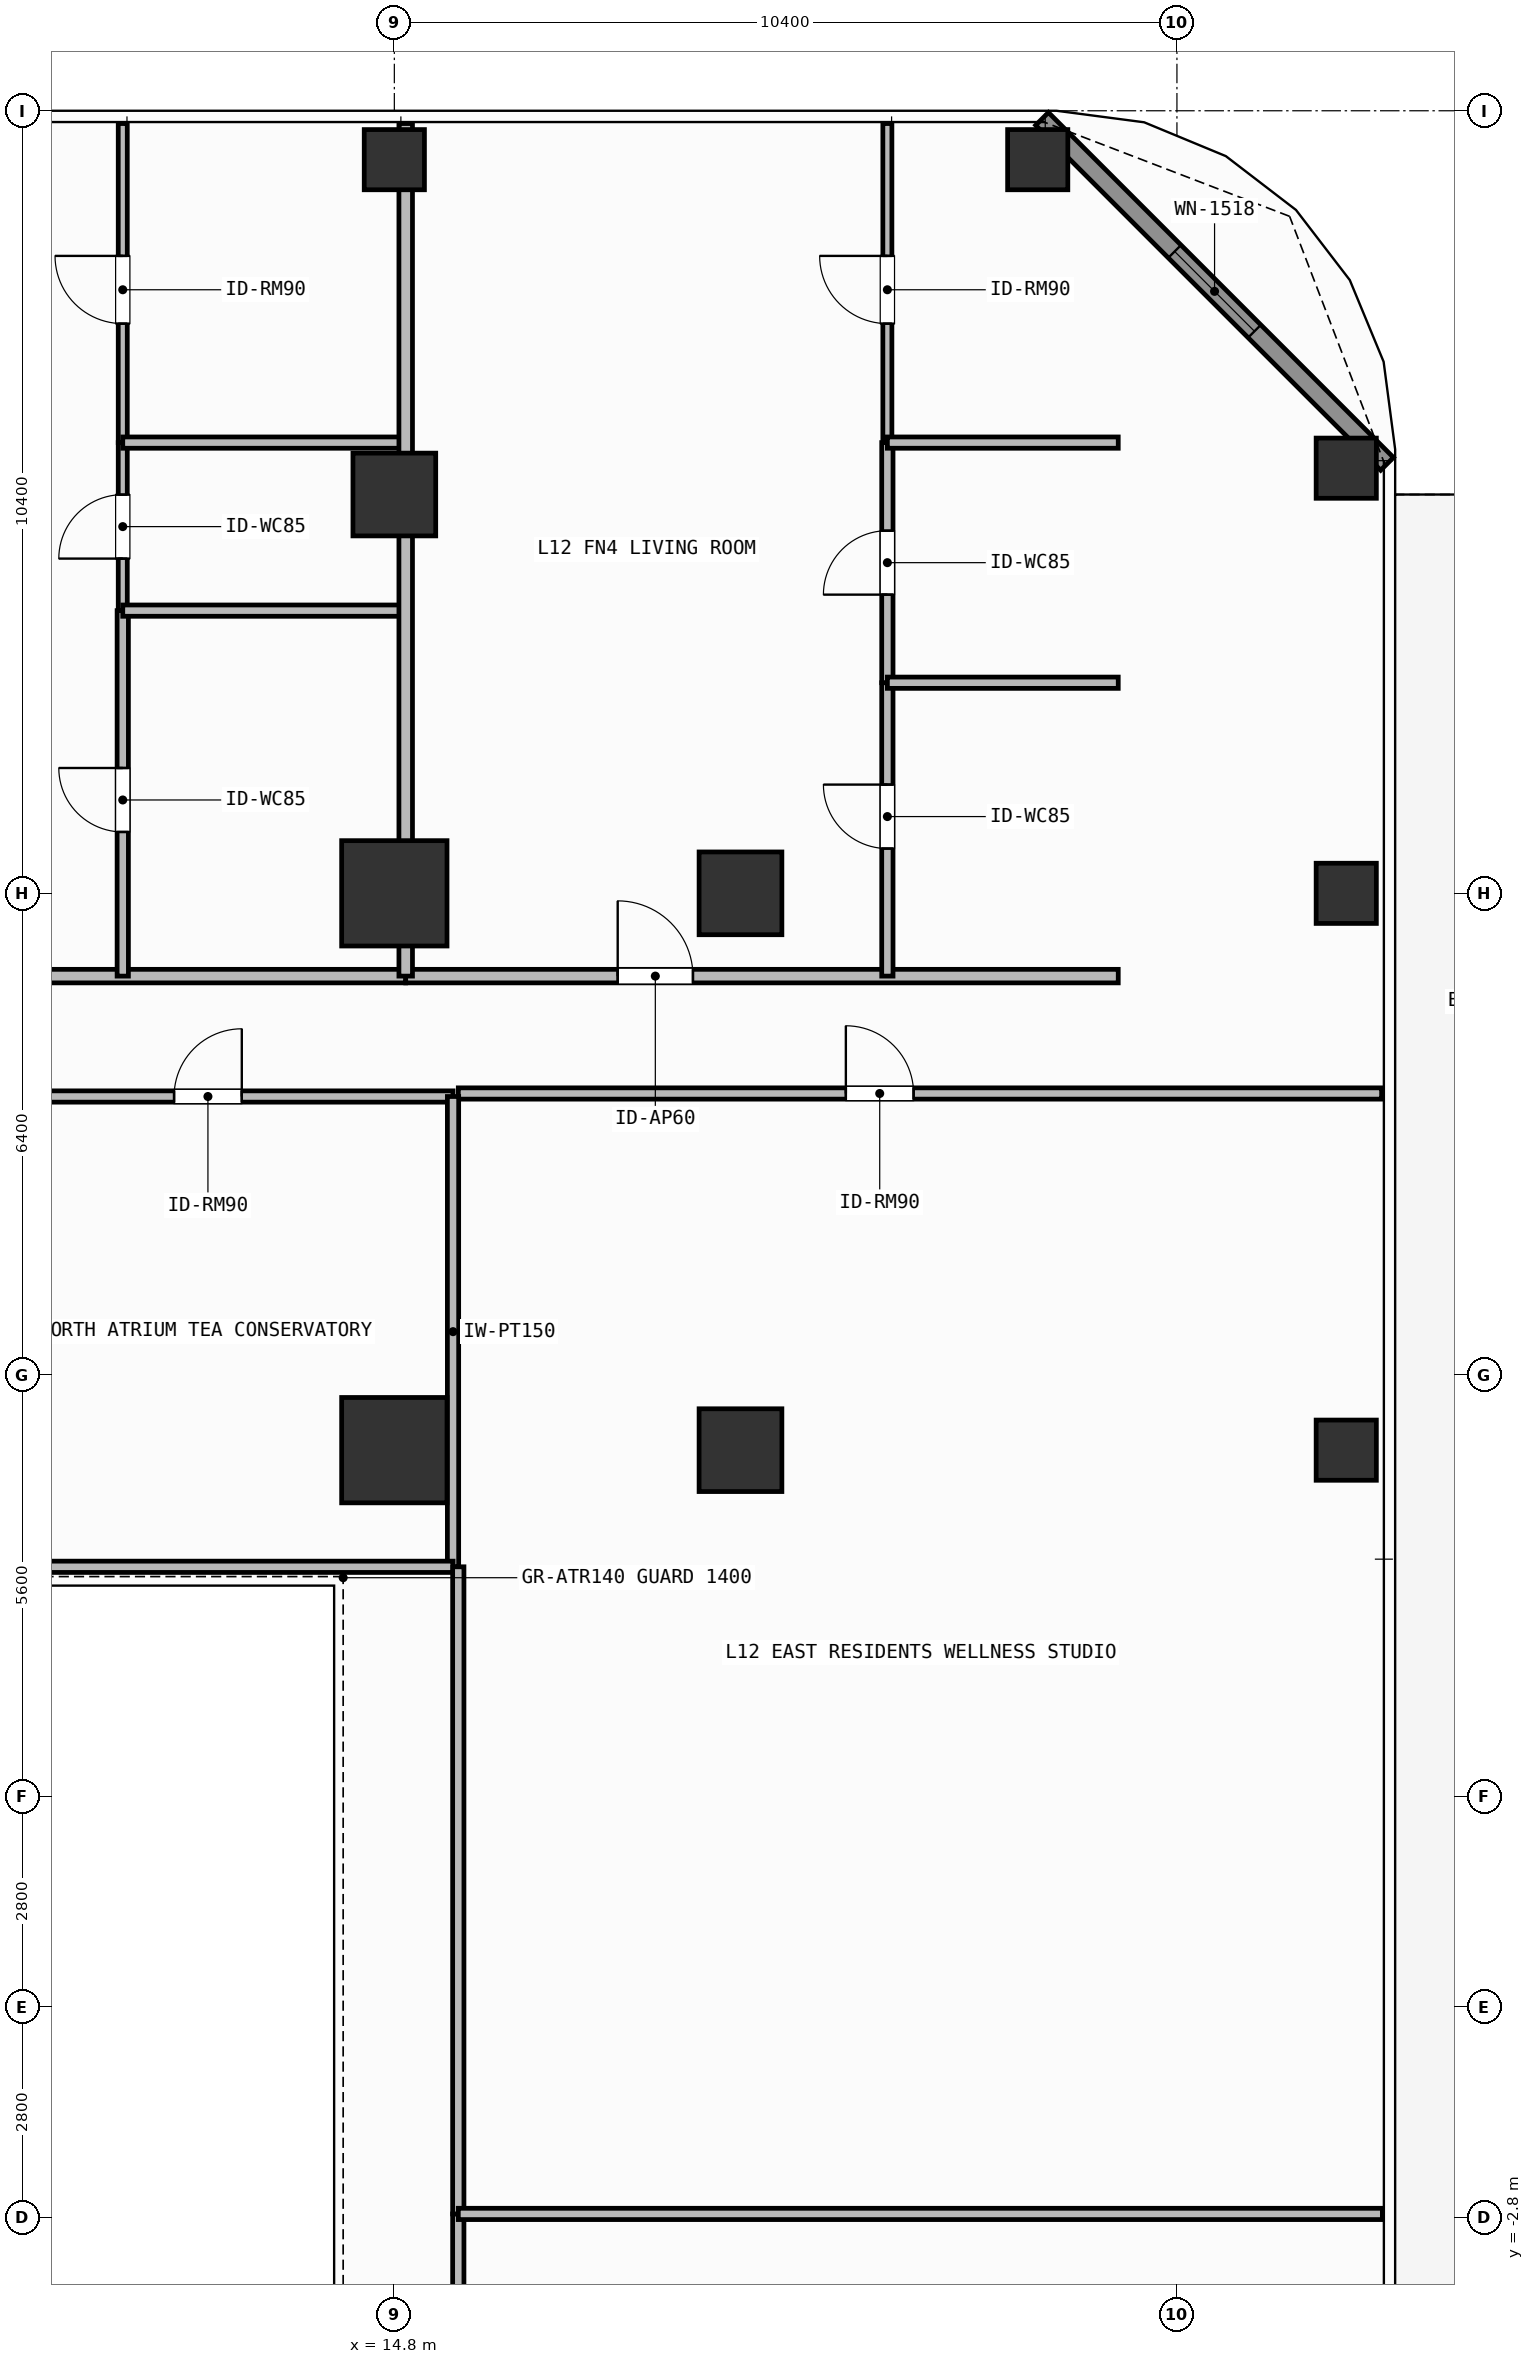
"""IFC4 building model, lengths in metres.
Left out: names, types, materials, properties, quantities, classifications, styles, units other than length and angle.
Written with IfcOpenShell. Run it as: python <this file> out.ifc"""

import sys

from ifc_helpers import new_model, si_unit, direction, frame, frame_2d, origin, origin_2d, place, context, subcontext, project, spatial, rectangle, hollow_rectangle, extrude, element, fill, save


model = new_model("IFC4")
c1 = context("Model", 3, precision=1e-05, world=origin(), true_north=direction((0.0, 1.0)))
c2 = subcontext(c1, "Body", "Model", "MODEL_VIEW")
j1 = project(units=[si_unit("LENGTHUNIT", "METRE"), si_unit("PLANEANGLEUNIT", "RADIAN")], contexts=[c1])
p1 = place(None, origin())
s1 = spatial("IfcSite", under=j1, at=p1, CompositionType="ELEMENT")
p2 = place(p1, origin())
s2 = spatial("IfcBuilding", under=s1, at=p2, CompositionType="ELEMENT")
p3 = place(p2, frame((0.0, 0.0, 46.2)))
s3 = spatial("IfcBuildingStorey", under=s2, at=p3, CompositionType="ELEMENT", Elevation=46.2)
for number, where, z_axis, x_axis in (
    (1, (14.8, 14.8, 0.0), (0.0, 0.0, 1.0), (1.0, 0.0, 0.0)),
    (2, (14.8, 7.4, 0.0), (0.0, 0.0, 1.0), (1.0, 0.0, 0.0)),
):
    element("IfcColumn", number, at=place(p3, frame(where, z_axis=z_axis, x_axis=x_axis)), inside=s3, PredefinedType="COLUMN", context=c2, shape_type="SweptSolid", body=[
        extrude(rectangle(XDim=1.4, YDim=1.4, at=origin_2d()), origin(), (0.0, 0.0, 1.0), 3.9),
    ])
for number, where, z_axis, x_axis in (
    (3, (19.4, 7.4, 0.0), (0.0, 0.0, 1.0), (1.0, 0.0, 0.0)),
    (4, (19.4, 14.8, 0.0), (0.0, 0.0, 1.0), (1.0, 0.0, 0.0)),
    (5, (14.8, 20.1, 0.0), (0.0, 0.0, 1.0), (1.0, 0.0, 0.0)),
):
    element("IfcColumn", number, at=place(p3, frame(where, z_axis=z_axis, x_axis=x_axis)), inside=s3, PredefinedType="COLUMN", context=c2, shape_type="SweptSolid", body=[
        extrude(rectangle(XDim=1.1, YDim=1.1, at=origin_2d()), origin(), (0.0, 0.0, 1.0), 3.9),
    ])
for number, where, z_axis, x_axis in (
    (6, (23.35, 24.55, 0.0), (0.0, 0.0, 1.0), (1.0, 0.0, 0.0)),
    (7, (27.45, 20.45, 0.0), (0.0, 0.0, 1.0), (1.0, 0.0, 0.0)),
    (8, (14.8, 24.55, 0.0), (0.0, 0.0, 1.0), (1.0, 0.0, 0.0)),
    (9, (27.45, 7.4, 0.0), (0.0, 0.0, 1.0), (1.0, 0.0, 0.0)),
    (10, (27.45, 14.8, 0.0), (0.0, 0.0, 1.0), (1.0, 0.0, 0.0)),
):
    element("IfcColumn", number, at=place(p3, frame(where, z_axis=z_axis, x_axis=x_axis)), inside=s3, PredefinedType="COLUMN", context=c2, shape_type="SweptSolid", body=[
        extrude(hollow_rectangle(XDim=0.8, YDim=0.8, WallThickness=0.036, at=origin_2d()), origin(), (0.0, 0.0, 1.0), 3.9),
    ])
p4 = place(p3, frame((23.408, 25.092, 0.0), z_axis=(0.0, 0.0, 1.0), x_axis=(0.707106781187, -0.707106781187, 0.0)))
e11 = element("IfcWall", 11, at=p4, inside=s3, PredefinedType="SOLIDWALL", context=c2, shape_type="SweptSolid", body=[
    extrude(rectangle(XDim=6.484, YDim=0.24, at=frame_2d((3.242, 0.0))), origin(), (0.0, 0.0, 1.0), 3.68),
])
p5 = place(p4, frame((2.492, 0.0, 0.8)))
e12 = element("IfcOpeningElement", 12, at=p5, cuts=e11, PredefinedType="OPENING", context=c2, shape_type="SweptSolid", body=[
    extrude(rectangle(XDim=1.5, YDim=1.85, at=frame_2d((0.75, 0.925))), frame((0.0, 0.13, 0.0), z_axis=(0.0, -1.0, 0.0), x_axis=(1.0, 0.0, 0.0)), (0.0, 0.0, 1.0), 0.26),
])
p6 = place(p3, frame((8.36, 12.1, 0.0), z_axis=(0.0, 0.0, 1.0), x_axis=(1.0, 0.0, 0.0)))
e13 = element("IfcWall", 13, at=p6, inside=s3, PredefinedType="PARTITIONING", context=c2, shape_type="SweptSolid", body=[
    extrude(rectangle(XDim=7.22, YDim=0.15, at=frame_2d((3.61, 0.0))), origin(), (0.0, 0.0, 1.0), 3.68),
])
p7 = place(p6, frame((3.513, 0.0, 0.0)))
e14 = element("IfcOpeningElement", 14, at=p7, cuts=e13, PredefinedType="OPENING", context=c2, shape_type="SweptSolid", body=[
    extrude(rectangle(XDim=0.9, YDim=2.1, at=frame_2d((0.45, 1.05))), frame((0.0, 0.085, 0.0), z_axis=(0.0, -1.0, 0.0), x_axis=(1.0, 0.0, 0.0)), (0.0, 0.0, 1.0), 0.17),
])
p8 = place(p3, frame((2.9, 13.7, 0.0), z_axis=(0.0, 0.0, 1.0), x_axis=(1.0, 0.0, 0.0)))
e15 = element("IfcWall", 15, at=p8, inside=s3, PredefinedType="PARTITIONING", context=c2, shape_type="SweptSolid", body=[
    extrude(rectangle(XDim=12.051, YDim=0.18, at=frame_2d((6.025, 0.0))), origin(), (0.0, 0.0, 1.0), 3.68),
])
p9 = place(p8, frame((5.347, 0.0, 0.0)))
e16 = element("IfcOpeningElement", 16, at=p9, cuts=e15, PredefinedType="OPENING", context=c2, shape_type="SweptSolid", body=[
    extrude(rectangle(XDim=1.0, YDim=2.2, at=frame_2d((0.5, 1.1))), frame((0.0, 0.1, 0.0), z_axis=(0.0, -1.0, 0.0), x_axis=(1.0, 0.0, 0.0)), (0.0, 0.0, 1.0), 0.2),
])
p10 = place(p3, frame((11.191, 13.7, 0.0), z_axis=(0.0, 0.0, 1.0), x_axis=(0.0, 1.0, 0.0)))
e17 = element("IfcWall", 17, at=p10, inside=s3, PredefinedType="PARTITIONING", context=c2, shape_type="SweptSolid", body=[
    extrude(rectangle(XDim=4.857, YDim=0.15, at=frame_2d((2.428, 0.0))), origin(), (0.0, 0.0, 1.0), 3.68),
])
p11 = place(p10, frame((1.916, 0.0, 0.0)))
e18 = element("IfcOpeningElement", 18, at=p11, cuts=e17, PredefinedType="OPENING", context=c2, shape_type="SweptSolid", body=[
    extrude(rectangle(XDim=0.85, YDim=2.1, at=frame_2d((0.425, 1.05))), frame((0.0, 0.085, 0.0), z_axis=(0.0, -1.0, 0.0), x_axis=(1.0, 0.0, 0.0)), (0.0, 0.0, 1.0), 0.17),
])
p12 = place(p3, frame((11.191, 18.557, 0.0), z_axis=(0.0, 0.0, 1.0), x_axis=(0.0, 1.0, 0.0)))
e19 = element("IfcWall", 19, at=p12, inside=s3, PredefinedType="PARTITIONING", context=c2, shape_type="SweptSolid", body=[
    extrude(rectangle(XDim=2.233, YDim=0.12, at=frame_2d((1.117, 0.0))), origin(), (0.0, 0.0, 1.0), 3.37),
])
p13 = place(p12, frame((0.691, 0.0, 0.0)))
e20 = element("IfcOpeningElement", 20, at=p13, cuts=e19, PredefinedType="OPENING", context=c2, shape_type="SweptSolid", body=[
    extrude(rectangle(XDim=0.85, YDim=2.1, at=frame_2d((0.425, 1.05))), frame((0.0, 0.07, 0.0), z_axis=(0.0, -1.0, 0.0), x_axis=(1.0, 0.0, 0.0)), (0.0, 0.0, 1.0), 0.14),
])
p14 = place(p3, frame((11.191, 20.79, 0.0), z_axis=(0.0, 0.0, 1.0), x_axis=(0.0, 1.0, 0.0)))
e21 = element("IfcWall", 21, at=p14, inside=s3, PredefinedType="PARTITIONING", context=c2, shape_type="SweptSolid", body=[
    extrude(rectangle(XDim=4.24, YDim=0.12, at=frame_2d((2.12, 0.0))), origin(), (0.0, 0.0, 1.0), 3.37),
])
p15 = place(p14, frame((1.581, 0.0, 0.0)))
e22 = element("IfcOpeningElement", 22, at=p15, cuts=e21, PredefinedType="OPENING", context=c2, shape_type="SweptSolid", body=[
    extrude(rectangle(XDim=0.9, YDim=2.1, at=frame_2d((0.45, 1.05))), frame((0.0, 0.07, 0.0), z_axis=(0.0, -1.0, 0.0), x_axis=(1.0, 0.0, 0.0)), (0.0, 0.0, 1.0), 0.14),
])
p16 = place(p3, frame((14.951, 13.7, 0.0), z_axis=(0.0, 0.0, 1.0), x_axis=(1.0, 0.0, 0.0)))
e23 = element("IfcWall", 23, at=p16, inside=s3, PredefinedType="PARTITIONING", context=c2, shape_type="SweptSolid", body=[
    extrude(rectangle(XDim=9.469, YDim=0.18, at=frame_2d((4.734, 0.0))), origin(), (0.0, 0.0, 1.0), 3.68),
])
p17 = place(p16, frame((2.817, 0.0, 0.0)))
e24 = element("IfcOpeningElement", 24, at=p17, cuts=e23, PredefinedType="OPENING", context=c2, shape_type="SweptSolid", body=[
    extrude(rectangle(XDim=1.0, YDim=2.2, at=frame_2d((0.5, 1.1))), frame((0.0, 0.1, 0.0), z_axis=(0.0, -1.0, 0.0), x_axis=(1.0, 0.0, 0.0)), (0.0, 0.0, 1.0), 0.2),
])
p18 = place(p3, frame((21.352, 13.7, 0.0), z_axis=(0.0, 0.0, 1.0), x_axis=(0.0, 1.0, 0.0)))
e25 = element("IfcWall", 25, at=p18, inside=s3, PredefinedType="PARTITIONING", context=c2, shape_type="SweptSolid", body=[
    extrude(rectangle(XDim=3.899, YDim=0.15, at=frame_2d((1.95, 0.0))), origin(), (0.0, 0.0, 1.0), 3.68),
])
p19 = place(p18, frame((1.695, 0.0, 0.0)))
e26 = element("IfcOpeningElement", 26, at=p19, cuts=e25, PredefinedType="OPENING", context=c2, shape_type="SweptSolid", body=[
    extrude(rectangle(XDim=0.85, YDim=2.1, at=frame_2d((0.425, 1.05))), frame((0.0, 0.085, 0.0), z_axis=(0.0, -1.0, 0.0), x_axis=(1.0, 0.0, 0.0)), (0.0, 0.0, 1.0), 0.17),
])
p20 = place(p3, frame((21.352, 17.599, 0.0), z_axis=(0.0, 0.0, 1.0), x_axis=(0.0, 1.0, 0.0)))
e27 = element("IfcWall", 27, at=p20, inside=s3, PredefinedType="PARTITIONING", context=c2, shape_type="SweptSolid", body=[
    extrude(rectangle(XDim=3.191, YDim=0.15, at=frame_2d((1.595, 0.0))), origin(), (0.0, 0.0, 1.0), 3.68),
])
p21 = place(p20, frame((1.17, 0.0, 0.0)))
e28 = element("IfcOpeningElement", 28, at=p21, cuts=e27, PredefinedType="OPENING", context=c2, shape_type="SweptSolid", body=[
    extrude(rectangle(XDim=0.85, YDim=2.1, at=frame_2d((0.425, 1.05))), frame((0.0, 0.085, 0.0), z_axis=(0.0, -1.0, 0.0), x_axis=(1.0, 0.0, 0.0)), (0.0, 0.0, 1.0), 0.17),
])
p22 = place(p3, frame((21.352, 20.79, 0.0), z_axis=(0.0, 0.0, 1.0), x_axis=(0.0, 1.0, 0.0)))
e29 = element("IfcWall", 29, at=p22, inside=s3, PredefinedType="PARTITIONING", context=c2, shape_type="SweptSolid", body=[
    extrude(rectangle(XDim=4.24, YDim=0.12, at=frame_2d((2.12, 0.0))), origin(), (0.0, 0.0, 1.0), 3.68),
])
p23 = place(p22, frame((1.581, 0.0, 0.0)))
e30 = element("IfcOpeningElement", 30, at=p23, cuts=e29, PredefinedType="OPENING", context=c2, shape_type="SweptSolid", body=[
    extrude(rectangle(XDim=0.9, YDim=2.1, at=frame_2d((0.45, 1.05))), frame((0.0, 0.07, 0.0), z_axis=(0.0, -1.0, 0.0), x_axis=(1.0, 0.0, 0.0)), (0.0, 0.0, 1.0), 0.14),
])
p24 = place(p3, frame((15.65, 12.14, 0.0), z_axis=(0.0, 0.0, 1.0), x_axis=(1.0, 0.0, 0.0)))
e31 = element("IfcWall", 31, at=p24, inside=s3, PredefinedType="PARTITIONING", context=c2, shape_type="SweptSolid", body=[
    extrude(rectangle(XDim=12.27, YDim=0.15, at=frame_2d((6.135, 0.0))), origin(), (0.0, 0.0, 1.0), 3.68),
])
p25 = place(p24, frame((5.15, 0.0, 0.0)))
e32 = element("IfcOpeningElement", 32, at=p25, cuts=e31, PredefinedType="OPENING", context=c2, shape_type="SweptSolid", body=[
    extrude(rectangle(XDim=0.9, YDim=2.1, at=frame_2d((0.45, 1.05))), frame((0.0, 0.085, 0.0), z_axis=(0.0, -1.0, 0.0), x_axis=(1.0, 0.0, 0.0)), (0.0, 0.0, 1.0), 0.17),
])
p26 = place(p3, frame((15.58, 5.85, 0.0), z_axis=(0.0, 0.0, 1.0), x_axis=(0.0, 1.0, 0.0)))
e33 = element("IfcWall", 33, at=p26, inside=s3, PredefinedType="PARTITIONING", context=c2, shape_type="SweptSolid", body=[
    extrude(rectangle(XDim=6.25, YDim=0.15, at=frame_2d((3.125, 0.0))), origin(), (0.0, 0.0, 1.0), 3.68),
])
p27 = place(p3, frame((8.96, 5.85, 0.0), z_axis=(0.0, 0.0, 1.0), x_axis=(1.0, 0.0, 0.0)))
e34 = element("IfcWall", 34, at=p27, inside=s3, PredefinedType="PARTITIONING", context=c2, shape_type="SweptSolid", body=[
    extrude(rectangle(XDim=6.62, YDim=0.15, at=frame_2d((3.31, 0.0))), origin(), (0.0, 0.0, 1.0), 3.68),
])
for number, where, z_axis, x_axis in (
    (35, (11.191, 18.557, 0.0), (0.0, 0.0, 1.0), (1.0, 0.0, 0.0)),
    (36, (11.191, 20.79, 0.0), (0.0, 0.0, 1.0), (1.0, 0.0, 0.0)),
):
    element("IfcWall", number, at=place(p3, frame(where, z_axis=z_axis, x_axis=x_axis)), inside=s3, PredefinedType="PARTITIONING", context=c2, shape_type="SweptSolid", body=[
        extrude(rectangle(XDim=3.76, YDim=0.15, at=frame_2d((1.88, 0.0))), origin(), (0.0, 0.0, 1.0), 3.68),
    ])
for number, where, z_axis, x_axis in (
    (37, (21.352, 17.599, 0.0), (0.0, 0.0, 1.0), (1.0, 0.0, 0.0)),
    (38, (21.352, 20.79, 0.0), (0.0, 0.0, 1.0), (1.0, 0.0, 0.0)),
):
    element("IfcWall", number, at=place(p3, frame(where, z_axis=z_axis, x_axis=x_axis)), inside=s3, PredefinedType="PARTITIONING", context=c2, shape_type="SweptSolid", body=[
        extrude(rectangle(XDim=3.068, YDim=0.15, at=frame_2d((1.534, 0.0))), origin(), (0.0, 0.0, 1.0), 3.68),
    ])
p28 = place(p3, frame((14.951, 13.7, 0.0), z_axis=(0.0, 0.0, 1.0), x_axis=(0.0, 1.0, 0.0)))
e39 = element("IfcWall", 39, at=p28, inside=s3, PredefinedType="PARTITIONING", context=c2, shape_type="SweptSolid", body=[
    extrude(rectangle(XDim=11.33, YDim=0.18, at=frame_2d((5.665, 0.0))), origin(), (0.0, 0.0, 1.0), 3.082),
])
p29 = place(p3, frame((15.65, -5.85, 0.0), z_axis=(0.0, 0.0, 1.0), x_axis=(0.0, 1.0, 0.0)))
e40 = element("IfcWall", 40, at=p29, inside=s3, PredefinedType="PARTITIONING", context=c2, shape_type="SweptSolid", body=[
    extrude(rectangle(XDim=3.1, YDim=0.15, at=frame_2d((1.55, 0.0))), origin(), (0.0, 0.0, 1.0), 3.68),
])
p30 = place(p3, frame((15.65, -2.75, 0.0), z_axis=(0.0, 0.0, 1.0), x_axis=(0.0, 1.0, 0.0)))
e41 = element("IfcWall", 41, at=p30, inside=s3, PredefinedType="PARTITIONING", context=c2, shape_type="SweptSolid", body=[
    extrude(rectangle(XDim=8.6, YDim=0.15, at=frame_2d((4.3, 0.0))), origin(), (0.0, 0.0, 1.0), 3.68),
])
p31 = place(p3, frame((15.65, -2.75, 0.0), z_axis=(0.0, 0.0, 1.0), x_axis=(1.0, 0.0, 0.0)))
e42 = element("IfcWall", 42, at=p31, inside=s3, PredefinedType="PARTITIONING", context=c2, shape_type="SweptSolid", body=[
    extrude(rectangle(XDim=12.28, YDim=0.15, at=frame_2d((6.14, 0.0))), origin(), (0.0, 0.0, 1.0), 3.68),
])
p32 = place(p5, origin())
e43 = element("IfcWindow", 43, at=p32, inside=s3, PartitioningType="SINGLE_PANEL", PredefinedType="WINDOW", context=c2, shape_type="SweptSolid", body=[
    extrude(rectangle(XDim=1.5, YDim=1.85, at=frame_2d((0.75, 0.925))), frame((0.0, 0.03, 0.0), z_axis=(0.0, -1.0, 0.0), x_axis=(1.0, 0.0, 0.0)), (0.0, 0.0, 1.0), 0.06),
])
fill(e12, e43)
p33 = place(p7, origin())
e44 = element("IfcDoor", 44, at=p33, inside=s3, OperationType="SINGLE_SWING_RIGHT", PredefinedType="DOOR", context=c2, shape_type="SweptSolid", body=[
    extrude(rectangle(XDim=0.9, YDim=2.1, at=frame_2d((0.45, 1.05))), frame((0.0, 0.025, 0.0), z_axis=(0.0, -1.0, 0.0), x_axis=(1.0, 0.0, 0.0)), (0.0, 0.0, 1.0), 0.05),
])
fill(e14, e44)
p34 = place(p11, origin())
e45 = element("IfcDoor", 45, at=p34, inside=s3, OperationType="SINGLE_SWING_RIGHT", PredefinedType="DOOR", context=c2, shape_type="SweptSolid", body=[
    extrude(rectangle(XDim=0.85, YDim=2.1, at=frame_2d((0.425, 1.05))), frame((0.0, 0.025, 0.0), z_axis=(0.0, -1.0, 0.0), x_axis=(1.0, 0.0, 0.0)), (0.0, 0.0, 1.0), 0.05),
])
fill(e18, e45)
p35 = place(p13, origin())
e46 = element("IfcDoor", 46, at=p35, inside=s3, OperationType="SINGLE_SWING_LEFT", PredefinedType="DOOR", context=c2, shape_type="SweptSolid", body=[
    extrude(rectangle(XDim=0.85, YDim=2.1, at=frame_2d((0.425, 1.05))), frame((0.0, 0.025, 0.0), z_axis=(0.0, -1.0, 0.0), x_axis=(1.0, 0.0, 0.0)), (0.0, 0.0, 1.0), 0.05),
])
fill(e20, e46)
p36 = place(p15, origin())
e47 = element("IfcDoor", 47, at=p36, inside=s3, OperationType="SINGLE_SWING_RIGHT", PredefinedType="DOOR", context=c2, shape_type="SweptSolid", body=[
    extrude(rectangle(XDim=0.9, YDim=2.1, at=frame_2d((0.45, 1.05))), frame((0.0, 0.025, 0.0), z_axis=(0.0, -1.0, 0.0), x_axis=(1.0, 0.0, 0.0)), (0.0, 0.0, 1.0), 0.05),
])
fill(e22, e47)
p37 = place(p17, origin())
e48 = element("IfcDoor", 48, at=p37, inside=s3, OperationType="SINGLE_SWING_LEFT", PredefinedType="DOOR", context=c2, shape_type="SweptSolid", body=[
    extrude(rectangle(XDim=1.0, YDim=2.2, at=frame_2d((0.5, 1.1))), frame((0.0, 0.025, 0.0), z_axis=(0.0, -1.0, 0.0), x_axis=(1.0, 0.0, 0.0)), (0.0, 0.0, 1.0), 0.05),
])
fill(e24, e48)
p38 = place(p19, origin())
e49 = element("IfcDoor", 49, at=p38, inside=s3, OperationType="SINGLE_SWING_RIGHT", PredefinedType="DOOR", context=c2, shape_type="SweptSolid", body=[
    extrude(rectangle(XDim=0.85, YDim=2.1, at=frame_2d((0.425, 1.05))), frame((0.0, 0.025, 0.0), z_axis=(0.0, -1.0, 0.0), x_axis=(1.0, 0.0, 0.0)), (0.0, 0.0, 1.0), 0.05),
])
fill(e26, e49)
p39 = place(p21, origin())
e50 = element("IfcDoor", 50, at=p39, inside=s3, OperationType="SINGLE_SWING_LEFT", PredefinedType="DOOR", context=c2, shape_type="SweptSolid", body=[
    extrude(rectangle(XDim=0.85, YDim=2.1, at=frame_2d((0.425, 1.05))), frame((0.0, 0.025, 0.0), z_axis=(0.0, -1.0, 0.0), x_axis=(1.0, 0.0, 0.0)), (0.0, 0.0, 1.0), 0.05),
])
fill(e28, e50)
p40 = place(p23, origin())
e51 = element("IfcDoor", 51, at=p40, inside=s3, OperationType="SINGLE_SWING_RIGHT", PredefinedType="DOOR", context=c2, shape_type="SweptSolid", body=[
    extrude(rectangle(XDim=0.9, YDim=2.1, at=frame_2d((0.45, 1.05))), frame((0.0, 0.025, 0.0), z_axis=(0.0, -1.0, 0.0), x_axis=(1.0, 0.0, 0.0)), (0.0, 0.0, 1.0), 0.05),
])
fill(e30, e51)
p41 = place(p25, origin())
e52 = element("IfcDoor", 52, at=p41, inside=s3, OperationType="SINGLE_SWING_LEFT", PredefinedType="DOOR", context=c2, shape_type="SweptSolid", body=[
    extrude(rectangle(XDim=0.9, YDim=2.1, at=frame_2d((0.45, 1.05))), frame((0.0, 0.025, 0.0), z_axis=(0.0, -1.0, 0.0), x_axis=(1.0, 0.0, 0.0)), (0.0, 0.0, 1.0), 0.05),
])
fill(e32, e52)
save(model, sys.argv[1])
